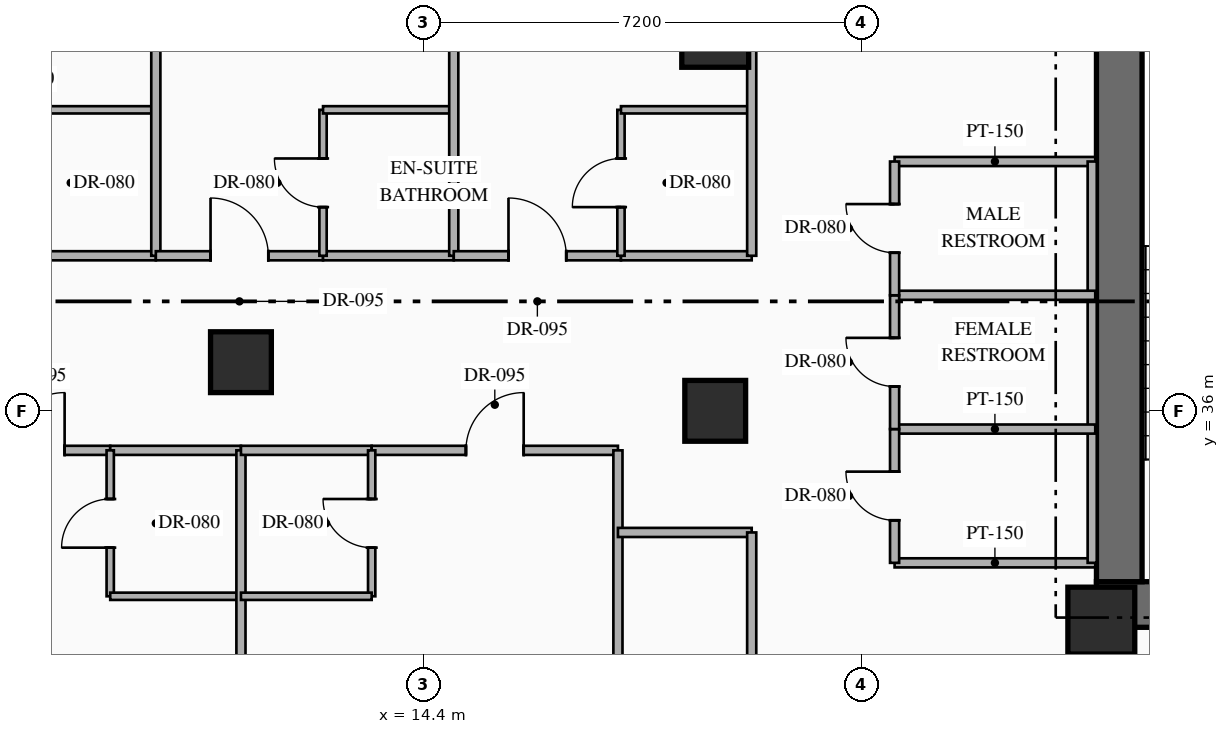
"""IFC4 building model, lengths in metres.
Left out: names, types, materials, properties, quantities, classifications, styles, units other than length and angle.
Written with IfcOpenShell. Run it as: python <this file> out.ifc"""

import sys

from ifc_helpers import new_model, si_unit, direction, frame, frame_2d, origin, origin_2d, place, context, subcontext, project, spatial, rectangle, hollow_rectangle, extrude, element, fill, save


model = new_model("IFC4")
c1 = context("Model", 3, precision=1e-05, world=origin(), true_north=direction((0.0, 1.0)))
c2 = subcontext(c1, "Body", "Model", "MODEL_VIEW")
j1 = project(units=[si_unit("LENGTHUNIT", "METRE"), si_unit("PLANEANGLEUNIT", "RADIAN")], contexts=[c1])
p1 = place(None, origin())
s1 = spatial("IfcSite", under=j1, at=p1, CompositionType="ELEMENT")
p2 = place(p1, origin())
s2 = spatial("IfcBuilding", under=s1, at=p2, CompositionType="ELEMENT")
p3 = place(p2, frame((0.0, 0.0, 46.65)))
s3 = spatial("IfcBuildingStorey", under=s2, at=p3, CompositionType="ELEMENT", Elevation=46.65)
p4 = place(p3, frame((25.47, 32.815, 0.0), z_axis=(0.0, 0.0, 1.0), x_axis=(1.0, 0.0, 0.0)))
e1 = element("IfcWall", 1, at=p4, inside=s3, PredefinedType="SHEAR", context=c2, shape_type="SweptSolid", body=[
    extrude(rectangle(XDim=8.08, YDim=0.75, at=frame_2d((4.04, 0.0))), origin(), (0.0, 0.0, 1.0), 3.35),
])
p5 = place(p4, frame((2.98, 0.0, 0.0)))
e2 = element("IfcOpeningElement", 2, at=p5, cuts=e1, PredefinedType="OPENING", context=c2, shape_type="SweptSolid", body=[
    extrude(rectangle(XDim=1.1, YDim=2.2, at=frame_2d((0.55, 1.1))), frame((0.0, 0.385, 0.0), z_axis=(0.0, -1.0, 0.0), x_axis=(1.0, 0.0, 0.0)), (0.0, 0.0, 1.0), 0.77),
])
p6 = place(p4, frame((5.73, 0.0, 0.0)))
e3 = element("IfcOpeningElement", 3, at=p6, cuts=e1, PredefinedType="OPENING", context=c2, shape_type="SweptSolid", body=[
    extrude(rectangle(XDim=1.1, YDim=2.15, at=frame_2d((0.55, 1.075))), frame((0.0, 0.385, 0.0), z_axis=(0.0, -1.0, 0.0), x_axis=(1.0, 0.0, 0.0)), (0.0, 0.0, 1.0), 0.77),
])
p7 = place(p3, frame((25.845, 33.19, 0.0), z_axis=(0.0, 0.0, 1.0), x_axis=(0.0, 1.0, 0.0)))
e4 = element("IfcWall", 4, at=p7, inside=s3, PredefinedType="SHEAR", context=c2, shape_type="SweptSolid", body=[
    extrude(rectangle(XDim=9.48, YDim=0.75, at=frame_2d((4.74, 0.0))), origin(), (0.0, 0.0, 1.0), 3.35),
])
p8 = place(p3, frame((25.55, 32.55, 0.0), z_axis=(0.0, 0.0, 1.0), x_axis=(1.0, 0.0, 0.0)))
e5 = element("IfcColumn", 5, at=p8, inside=s3, PredefinedType="COLUMN", context=c2, shape_type="SweptSolid", body=[
    extrude(rectangle(XDim=1.1, YDim=1.1, at=origin_2d()), origin(), (0.0, 0.0, 1.0), 3.35),
])
p9 = place(p3, frame((19.2, 42.2, 0.0), z_axis=(0.0, 0.0, 1.0), x_axis=(1.0, 0.0, 0.0)))
e6 = element("IfcColumn", 6, at=p9, inside=s3, PredefinedType="COLUMN", context=c2, shape_type="SweptSolid", body=[
    extrude(hollow_rectangle(XDim=1.1, YDim=1.1, WallThickness=0.04, at=origin_2d()), origin(), (0.0, 0.0, 1.0), 3.35),
])
for number, where, z_axis, x_axis in (
    (7, (11.4, 36.8, 0.0), (0.0, 0.0, 1.0), (1.0, 0.0, 0.0)),
    (8, (19.2, 36.0, 0.0), (0.0, 0.0, 1.0), (1.0, 0.0, 0.0)),
):
    element("IfcColumn", number, at=place(p3, frame(where, z_axis=z_axis, x_axis=x_axis)), inside=s3, PredefinedType="COLUMN", context=c2, shape_type="SweptSolid", body=[
        extrude(hollow_rectangle(XDim=1.0, YDim=1.0, WallThickness=0.038, at=origin_2d()), origin(), (0.0, 0.0, 1.0), 3.35),
    ])
for number, where, z_axis, x_axis in (
    (9, (22.15, 33.5, 0.0), (0.0, 0.0, 1.0), (1.0, 0.0, 0.0)),
    (10, (22.15, 40.1, 0.0), (0.0, 0.0, 1.0), (1.0, 0.0, 0.0)),
):
    element("IfcWall", number, at=place(p3, frame(where, z_axis=z_axis, x_axis=x_axis)), inside=s3, PredefinedType="PARTITIONING", context=c2, shape_type="SweptSolid", body=[
        extrude(rectangle(XDim=3.3, YDim=0.15, at=frame_2d((1.65, 0.0))), origin(), (0.0, 0.0, 1.0), 3.13),
    ])
p10 = place(p3, frame((25.4, 33.5, 0.0), z_axis=(0.0, 0.0, 1.0), x_axis=(0.0, 1.0, 0.0)))
e11 = element("IfcWall", 11, at=p10, inside=s3, PredefinedType="PARTITIONING", context=c2, shape_type="SweptSolid", body=[
    extrude(rectangle(XDim=6.6, YDim=0.15, at=frame_2d((3.3, 0.0))), origin(), (0.0, 0.0, 1.0), 3.13),
])
for number, where, z_axis, x_axis in (
    (12, (22.15, 35.7, 0.0), (0.0, 0.0, 1.0), (1.0, 0.0, 0.0)),
    (13, (22.15, 37.9, 0.0), (0.0, 0.0, 1.0), (1.0, 0.0, 0.0)),
):
    element("IfcWall", number, at=place(p3, frame(where, z_axis=z_axis, x_axis=x_axis)), inside=s3, PredefinedType="PARTITIONING", context=c2, shape_type="SweptSolid", body=[
        extrude(rectangle(XDim=3.3, YDim=0.15, at=frame_2d((1.65, 0.0))), origin(), (0.0, 0.0, 1.0), 3.13),
    ])
p11 = place(p3, frame((22.15, 33.5, 0.0), z_axis=(0.0, 0.0, 1.0), x_axis=(0.0, 1.0, 0.0)))
e14 = element("IfcWall", 14, at=p11, inside=s3, PredefinedType="PARTITIONING", context=c2, shape_type="SweptSolid", body=[
    extrude(rectangle(XDim=2.2, YDim=0.15, at=frame_2d((1.1, 0.0))), origin(), (0.0, 0.0, 1.0), 3.13),
])
p12 = place(p11, frame((0.7, 0.0, 0.0)))
e15 = element("IfcOpeningElement", 15, at=p12, cuts=e14, PredefinedType="OPENING", context=c2, shape_type="SweptSolid", body=[
    extrude(rectangle(XDim=0.8, YDim=2.06, at=frame_2d((0.4, 1.03))), frame((0.0, 0.085, 0.0), z_axis=(0.0, -1.0, 0.0), x_axis=(1.0, 0.0, 0.0)), (0.0, 0.0, 1.0), 0.17),
])
p13 = place(p3, frame((22.15, 35.7, 0.0), z_axis=(0.0, 0.0, 1.0), x_axis=(0.0, 1.0, 0.0)))
e16 = element("IfcWall", 16, at=p13, inside=s3, PredefinedType="PARTITIONING", context=c2, shape_type="SweptSolid", body=[
    extrude(rectangle(XDim=2.2, YDim=0.15, at=frame_2d((1.1, 0.0))), origin(), (0.0, 0.0, 1.0), 3.13),
])
p14 = place(p13, frame((0.7, 0.0, 0.0)))
e17 = element("IfcOpeningElement", 17, at=p14, cuts=e16, PredefinedType="OPENING", context=c2, shape_type="SweptSolid", body=[
    extrude(rectangle(XDim=0.8, YDim=2.06, at=frame_2d((0.4, 1.03))), frame((0.0, 0.085, 0.0), z_axis=(0.0, -1.0, 0.0), x_axis=(1.0, 0.0, 0.0)), (0.0, 0.0, 1.0), 0.17),
])
p15 = place(p3, frame((22.15, 37.9, 0.0), z_axis=(0.0, 0.0, 1.0), x_axis=(0.0, 1.0, 0.0)))
e18 = element("IfcWall", 18, at=p15, inside=s3, PredefinedType="PARTITIONING", context=c2, shape_type="SweptSolid", body=[
    extrude(rectangle(XDim=2.2, YDim=0.15, at=frame_2d((1.1, 0.0))), origin(), (0.0, 0.0, 1.0), 3.13),
])
p16 = place(p15, frame((0.7, 0.0, 0.0)))
e19 = element("IfcOpeningElement", 19, at=p16, cuts=e18, PredefinedType="OPENING", context=c2, shape_type="SweptSolid", body=[
    extrude(rectangle(XDim=0.8, YDim=2.06, at=frame_2d((0.4, 1.03))), frame((0.0, 0.085, 0.0), z_axis=(0.0, -1.0, 0.0), x_axis=(1.0, 0.0, 0.0)), (0.0, 0.0, 1.0), 0.17),
])
p17 = place(p3, frame((7.85, 38.55, 0.0), z_axis=(0.0, 0.0, 1.0), x_axis=(1.0, 0.0, 0.0)))
e20 = element("IfcWall", 20, at=p17, inside=s3, PredefinedType="PARTITIONING", context=c2, shape_type="SweptSolid", body=[
    extrude(rectangle(XDim=2.15, YDim=0.15, at=frame_2d((1.075, 0.0))), origin(), (0.0, 0.0, 1.0), 2.775),
])
p18 = place(p3, frame((7.85, 40.95, 0.0), z_axis=(0.0, 0.0, 1.0), x_axis=(1.0, 0.0, 0.0)))
e21 = element("IfcWall", 21, at=p18, inside=s3, PredefinedType="PARTITIONING", context=c2, shape_type="SweptSolid", body=[
    extrude(rectangle(XDim=2.15, YDim=0.12, at=frame_2d((1.075, 0.0))), origin(), (0.0, 0.0, 1.0), 2.775),
])
p19 = place(p3, frame((10.0, 38.55, 0.0), z_axis=(0.0, 0.0, 1.0), x_axis=(0.0, 1.0, 0.0)))
e22 = element("IfcWall", 22, at=p19, inside=s3, PredefinedType="PARTITIONING", context=c2, shape_type="SweptSolid", body=[
    extrude(rectangle(XDim=11.65, YDim=0.15, at=frame_2d((5.825, 0.0))), origin(), (0.0, 0.0, 1.0), 3.13),
])
p20 = place(p3, frame((10.0, 38.55, 0.0), z_axis=(0.0, 0.0, 1.0), x_axis=(1.0, 0.0, 0.0)))
e23 = element("IfcWall", 23, at=p20, inside=s3, PredefinedType="PARTITIONING", context=c2, shape_type="SweptSolid", body=[
    extrude(rectangle(XDim=2.75, YDim=0.15, at=frame_2d((1.375, 0.0))), origin(), (0.0, 0.0, 1.0), 2.775),
])
p21 = place(p20, frame((0.9, 0.0, 0.0)))
e24 = element("IfcOpeningElement", 24, at=p21, cuts=e23, PredefinedType="OPENING", context=c2, shape_type="SweptSolid", body=[
    extrude(rectangle(XDim=0.95, YDim=2.15, at=frame_2d((0.475, 1.075))), frame((0.0, 0.085, 0.0), z_axis=(0.0, -1.0, 0.0), x_axis=(1.0, 0.0, 0.0)), (0.0, 0.0, 1.0), 0.17),
])
p22 = place(p3, frame((12.75, 38.55, 0.0), z_axis=(0.0, 0.0, 1.0), x_axis=(1.0, 0.0, 0.0)))
e25 = element("IfcWall", 25, at=p22, inside=s3, PredefinedType="PARTITIONING", context=c2, shape_type="SweptSolid", body=[
    extrude(rectangle(XDim=2.15, YDim=0.15, at=frame_2d((1.075, 0.0))), origin(), (0.0, 0.0, 1.0), 2.775),
])
p23 = place(p3, frame((12.75, 38.55, 0.0), z_axis=(0.0, 0.0, 1.0), x_axis=(0.0, 1.0, 0.0)))
e26 = element("IfcWall", 26, at=p23, inside=s3, PredefinedType="PARTITIONING", context=c2, shape_type="SweptSolid", body=[
    extrude(rectangle(XDim=2.4, YDim=0.12, at=frame_2d((1.2, 0.0))), origin(), (0.0, 0.0, 1.0), 3.13),
])
p24 = place(p23, frame((0.8, 0.0, 0.0)))
e27 = element("IfcOpeningElement", 27, at=p24, cuts=e26, PredefinedType="OPENING", context=c2, shape_type="SweptSolid", body=[
    extrude(rectangle(XDim=0.8, YDim=2.06, at=frame_2d((0.4, 1.03))), frame((0.0, 0.07, 0.0), z_axis=(0.0, -1.0, 0.0), x_axis=(1.0, 0.0, 0.0)), (0.0, 0.0, 1.0), 0.14),
])
p25 = place(p3, frame((12.75, 40.95, 0.0), z_axis=(0.0, 0.0, 1.0), x_axis=(1.0, 0.0, 0.0)))
e28 = element("IfcWall", 28, at=p25, inside=s3, PredefinedType="PARTITIONING", context=c2, shape_type="SweptSolid", body=[
    extrude(rectangle(XDim=2.15, YDim=0.12, at=frame_2d((1.075, 0.0))), origin(), (0.0, 0.0, 1.0), 2.775),
])
p26 = place(p3, frame((14.9, 38.55, 0.0), z_axis=(0.0, 0.0, 1.0), x_axis=(0.0, 1.0, 0.0)))
e29 = element("IfcWall", 29, at=p26, inside=s3, PredefinedType="PARTITIONING", context=c2, shape_type="SweptSolid", body=[
    extrude(rectangle(XDim=11.65, YDim=0.15, at=frame_2d((5.825, 0.0))), origin(), (0.0, 0.0, 1.0), 3.13),
])
p27 = place(p3, frame((14.9, 38.55, 0.0), z_axis=(0.0, 0.0, 1.0), x_axis=(1.0, 0.0, 0.0)))
e30 = element("IfcWall", 30, at=p27, inside=s3, PredefinedType="PARTITIONING", context=c2, shape_type="SweptSolid", body=[
    extrude(rectangle(XDim=2.75, YDim=0.15, at=frame_2d((1.375, 0.0))), origin(), (0.0, 0.0, 1.0), 2.775),
])
p28 = place(p27, frame((0.9, 0.0, 0.0)))
e31 = element("IfcOpeningElement", 31, at=p28, cuts=e30, PredefinedType="OPENING", context=c2, shape_type="SweptSolid", body=[
    extrude(rectangle(XDim=0.95, YDim=2.15, at=frame_2d((0.475, 1.075))), frame((0.0, 0.085, 0.0), z_axis=(0.0, -1.0, 0.0), x_axis=(1.0, 0.0, 0.0)), (0.0, 0.0, 1.0), 0.17),
])
p29 = place(p3, frame((17.65, 38.55, 0.0), z_axis=(0.0, 0.0, 1.0), x_axis=(1.0, 0.0, 0.0)))
e32 = element("IfcWall", 32, at=p29, inside=s3, PredefinedType="PARTITIONING", context=c2, shape_type="SweptSolid", body=[
    extrude(rectangle(XDim=2.15, YDim=0.15, at=frame_2d((1.075, 0.0))), origin(), (0.0, 0.0, 1.0), 2.775),
])
p30 = place(p3, frame((17.65, 38.55, 0.0), z_axis=(0.0, 0.0, 1.0), x_axis=(0.0, 1.0, 0.0)))
e33 = element("IfcWall", 33, at=p30, inside=s3, PredefinedType="PARTITIONING", context=c2, shape_type="SweptSolid", body=[
    extrude(rectangle(XDim=2.4, YDim=0.12, at=frame_2d((1.2, 0.0))), origin(), (0.0, 0.0, 1.0), 3.13),
])
p31 = place(p30, frame((0.8, 0.0, 0.0)))
e34 = element("IfcOpeningElement", 34, at=p31, cuts=e33, PredefinedType="OPENING", context=c2, shape_type="SweptSolid", body=[
    extrude(rectangle(XDim=0.8, YDim=2.06, at=frame_2d((0.4, 1.03))), frame((0.0, 0.07, 0.0), z_axis=(0.0, -1.0, 0.0), x_axis=(1.0, 0.0, 0.0)), (0.0, 0.0, 1.0), 0.14),
])
p32 = place(p3, frame((17.65, 40.95, 0.0), z_axis=(0.0, 0.0, 1.0), x_axis=(1.0, 0.0, 0.0)))
e35 = element("IfcWall", 35, at=p32, inside=s3, PredefinedType="PARTITIONING", context=c2, shape_type="SweptSolid", body=[
    extrude(rectangle(XDim=2.15, YDim=0.12, at=frame_2d((1.075, 0.0))), origin(), (0.0, 0.0, 1.0), 2.775),
])
p33 = place(p3, frame((19.8, 38.55, 0.0), z_axis=(0.0, 0.0, 1.0), x_axis=(0.0, 1.0, 0.0)))
e36 = element("IfcWall", 36, at=p33, inside=s3, PredefinedType="PARTITIONING", context=c2, shape_type="SweptSolid", body=[
    extrude(rectangle(XDim=11.65, YDim=0.15, at=frame_2d((5.825, 0.0))), origin(), (0.0, 0.0, 1.0), 3.13),
])
p34 = place(p3, frame((6.8, 35.35, 0.0), z_axis=(0.0, 0.0, 1.0), x_axis=(1.0, 0.0, 0.0)))
e37 = element("IfcWall", 37, at=p34, inside=s3, PredefinedType="PARTITIONING", context=c2, shape_type="SweptSolid", body=[
    extrude(rectangle(XDim=2.45, YDim=0.15, at=frame_2d((1.225, 0.0))), origin(), (0.0, 0.0, 1.0), 3.13),
])
p35 = place(p34, frame((0.75, 0.0, 0.0)))
e38 = element("IfcOpeningElement", 38, at=p35, cuts=e37, PredefinedType="OPENING", context=c2, shape_type="SweptSolid", body=[
    extrude(rectangle(XDim=0.95, YDim=2.15, at=frame_2d((0.475, 1.075))), frame((0.0, 0.085, 0.0), z_axis=(0.0, -1.0, 0.0), x_axis=(1.0, 0.0, 0.0)), (0.0, 0.0, 1.0), 0.17),
])
p36 = place(p3, frame((9.25, 35.35, 0.0), z_axis=(0.0, 0.0, 1.0), x_axis=(1.0, 0.0, 0.0)))
e39 = element("IfcWall", 39, at=p36, inside=s3, PredefinedType="PARTITIONING", context=c2, shape_type="SweptSolid", body=[
    extrude(rectangle(XDim=2.15, YDim=0.15, at=frame_2d((1.075, 0.0))), origin(), (0.0, 0.0, 1.0), 3.13),
])
p37 = place(p3, frame((9.25, 32.95, 0.0), z_axis=(0.0, 0.0, 1.0), x_axis=(0.0, 1.0, 0.0)))
e40 = element("IfcWall", 40, at=p37, inside=s3, PredefinedType="PARTITIONING", context=c2, shape_type="SweptSolid", body=[
    extrude(rectangle(XDim=2.4, YDim=0.12, at=frame_2d((1.2, 0.0))), origin(), (0.0, 0.0, 1.0), 3.13),
])
p38 = place(p37, frame((0.8, 0.0, 0.0)))
e41 = element("IfcOpeningElement", 41, at=p38, cuts=e40, PredefinedType="OPENING", context=c2, shape_type="SweptSolid", body=[
    extrude(rectangle(XDim=0.8, YDim=2.06, at=frame_2d((0.4, 1.03))), frame((0.0, 0.07, 0.0), z_axis=(0.0, -1.0, 0.0), x_axis=(1.0, 0.0, 0.0)), (0.0, 0.0, 1.0), 0.14),
])
p39 = place(p3, frame((9.25, 32.95, 0.0), z_axis=(0.0, 0.0, 1.0), x_axis=(1.0, 0.0, 0.0)))
e42 = element("IfcWall", 42, at=p39, inside=s3, PredefinedType="PARTITIONING", context=c2, shape_type="SweptSolid", body=[
    extrude(rectangle(XDim=2.15, YDim=0.12, at=frame_2d((1.075, 0.0))), origin(), (0.0, 0.0, 1.0), 3.13),
])
p40 = place(p3, frame((11.4, 23.6, 0.0), z_axis=(0.0, 0.0, 1.0), x_axis=(0.0, 1.0, 0.0)))
e43 = element("IfcWall", 43, at=p40, inside=s3, PredefinedType="PARTITIONING", context=c2, shape_type="SweptSolid", body=[
    extrude(rectangle(XDim=11.75, YDim=0.15, at=frame_2d((5.875, 0.0))), origin(), (0.0, 0.0, 1.0), 2.425),
])
p41 = place(p3, frame((11.4, 35.35, 0.0), z_axis=(0.0, 0.0, 1.0), x_axis=(1.0, 0.0, 0.0)))
e44 = element("IfcWall", 44, at=p41, inside=s3, PredefinedType="PARTITIONING", context=c2, shape_type="SweptSolid", body=[
    extrude(rectangle(XDim=2.15, YDim=0.15, at=frame_2d((1.075, 0.0))), origin(), (0.0, 0.0, 1.0), 3.13),
])
p42 = place(p3, frame((13.55, 35.35, 0.0), z_axis=(0.0, 0.0, 1.0), x_axis=(1.0, 0.0, 0.0)))
e45 = element("IfcWall", 45, at=p42, inside=s3, PredefinedType="PARTITIONING", context=c2, shape_type="SweptSolid", body=[
    extrude(rectangle(XDim=4.05, YDim=0.15, at=frame_2d((2.025, 0.0))), origin(), (0.0, 0.0, 1.0), 3.13),
])
p43 = place(p42, frame((1.55, 0.0, 0.0)))
e46 = element("IfcOpeningElement", 46, at=p43, cuts=e45, PredefinedType="OPENING", context=c2, shape_type="SweptSolid", body=[
    extrude(rectangle(XDim=0.95, YDim=2.15, at=frame_2d((0.475, 1.075))), frame((0.0, 0.085, 0.0), z_axis=(0.0, -1.0, 0.0), x_axis=(1.0, 0.0, 0.0)), (0.0, 0.0, 1.0), 0.17),
])
p44 = place(p3, frame((13.55, 32.95, 0.0), z_axis=(0.0, 0.0, 1.0), x_axis=(0.0, 1.0, 0.0)))
e47 = element("IfcWall", 47, at=p44, inside=s3, PredefinedType="PARTITIONING", context=c2, shape_type="SweptSolid", body=[
    extrude(rectangle(XDim=2.4, YDim=0.12, at=frame_2d((1.2, 0.0))), origin(), (0.0, 0.0, 1.0), 3.13),
])
p45 = place(p44, frame((0.8, 0.0, 0.0)))
e48 = element("IfcOpeningElement", 48, at=p45, cuts=e47, PredefinedType="OPENING", context=c2, shape_type="SweptSolid", body=[
    extrude(rectangle(XDim=0.8, YDim=2.06, at=frame_2d((0.4, 1.03))), frame((0.0, 0.07, 0.0), z_axis=(0.0, -1.0, 0.0), x_axis=(1.0, 0.0, 0.0)), (0.0, 0.0, 1.0), 0.14),
])
p46 = place(p3, frame((11.4, 32.95, 0.0), z_axis=(0.0, 0.0, 1.0), x_axis=(1.0, 0.0, 0.0)))
e49 = element("IfcWall", 49, at=p46, inside=s3, PredefinedType="PARTITIONING", context=c2, shape_type="SweptSolid", body=[
    extrude(rectangle(XDim=2.15, YDim=0.12, at=frame_2d((1.075, 0.0))), origin(), (0.0, 0.0, 1.0), 3.13),
])
p47 = place(p3, frame((17.6, 23.6, 0.0), z_axis=(0.0, 0.0, 1.0), x_axis=(0.0, 1.0, 0.0)))
e50 = element("IfcWall", 50, at=p47, inside=s3, PredefinedType="PARTITIONING", context=c2, shape_type="SweptSolid", body=[
    extrude(rectangle(XDim=11.75, YDim=0.15, at=frame_2d((5.875, 0.0))), origin(), (0.0, 0.0, 1.0), 3.13),
])
p48 = place(p3, frame((17.6, 34.0, 0.0), z_axis=(0.0, 0.0, 1.0), x_axis=(1.0, 0.0, 0.0)))
e51 = element("IfcWall", 51, at=p48, inside=s3, PredefinedType="PARTITIONING", context=c2, shape_type="SweptSolid", body=[
    extrude(rectangle(XDim=2.2, YDim=0.15, at=frame_2d((1.1, 0.0))), origin(), (0.0, 0.0, 1.0), 3.13),
])
p49 = place(p3, frame((19.8, 23.44, 0.0), z_axis=(0.0, 0.0, 1.0), x_axis=(0.0, 1.0, 0.0)))
e52 = element("IfcWall", 52, at=p49, inside=s3, PredefinedType="PARTITIONING", context=c2, shape_type="SweptSolid", body=[
    extrude(rectangle(XDim=10.56, YDim=0.15, at=frame_2d((5.28, 0.0))), origin(), (0.0, 0.0, 1.0), 3.13),
])
p50 = place(p49, frame((3.495, 0.0, 0.0)))
e53 = element("IfcOpeningElement", 53, at=p50, cuts=e52, PredefinedType="OPENING", context=c2, shape_type="SweptSolid", body=[
    extrude(rectangle(XDim=0.9, YDim=2.15, at=frame_2d((0.45, 1.075))), frame((0.0, 0.085, 0.0), z_axis=(0.0, -1.0, 0.0), x_axis=(1.0, 0.0, 0.0)), (0.0, 0.0, 1.0), 0.17),
])
p51 = place(p12, origin())
e54 = element("IfcDoor", 54, at=p51, inside=s3, OperationType="SINGLE_SWING_RIGHT", PredefinedType="DOOR", context=c2, shape_type="SweptSolid", body=[
    extrude(rectangle(XDim=0.8, YDim=2.06, at=frame_2d((0.4, 1.03))), frame((0.0, 0.025, 0.0), z_axis=(0.0, -1.0, 0.0), x_axis=(1.0, 0.0, 0.0)), (0.0, 0.0, 1.0), 0.05),
])
fill(e15, e54)
p52 = place(p14, origin())
e55 = element("IfcDoor", 55, at=p52, inside=s3, OperationType="SINGLE_SWING_RIGHT", PredefinedType="DOOR", context=c2, shape_type="SweptSolid", body=[
    extrude(rectangle(XDim=0.8, YDim=2.06, at=frame_2d((0.4, 1.03))), frame((0.0, 0.025, 0.0), z_axis=(0.0, -1.0, 0.0), x_axis=(1.0, 0.0, 0.0)), (0.0, 0.0, 1.0), 0.05),
])
fill(e17, e55)
p53 = place(p16, origin())
e56 = element("IfcDoor", 56, at=p53, inside=s3, OperationType="SINGLE_SWING_RIGHT", PredefinedType="DOOR", context=c2, shape_type="SweptSolid", body=[
    extrude(rectangle(XDim=0.8, YDim=2.06, at=frame_2d((0.4, 1.03))), frame((0.0, 0.025, 0.0), z_axis=(0.0, -1.0, 0.0), x_axis=(1.0, 0.0, 0.0)), (0.0, 0.0, 1.0), 0.05),
])
fill(e19, e56)
p54 = place(p21, origin())
e57 = element("IfcDoor", 57, at=p54, inside=s3, OperationType="SINGLE_SWING_LEFT", PredefinedType="DOOR", context=c2, shape_type="SweptSolid", body=[
    extrude(rectangle(XDim=0.95, YDim=2.15, at=frame_2d((0.475, 1.075))), frame((0.0, 0.025, 0.0), z_axis=(0.0, -1.0, 0.0), x_axis=(1.0, 0.0, 0.0)), (0.0, 0.0, 1.0), 0.05),
])
fill(e24, e57)
p55 = place(p24, origin())
e58 = element("IfcDoor", 58, at=p55, inside=s3, OperationType="SINGLE_SWING_RIGHT", PredefinedType="DOOR", context=c2, shape_type="SweptSolid", body=[
    extrude(rectangle(XDim=0.8, YDim=2.06, at=frame_2d((0.4, 1.03))), frame((0.0, 0.025, 0.0), z_axis=(0.0, -1.0, 0.0), x_axis=(1.0, 0.0, 0.0)), (0.0, 0.0, 1.0), 0.05),
])
fill(e27, e58)
p56 = place(p28, origin())
e59 = element("IfcDoor", 59, at=p56, inside=s3, OperationType="SINGLE_SWING_LEFT", PredefinedType="DOOR", context=c2, shape_type="SweptSolid", body=[
    extrude(rectangle(XDim=0.95, YDim=2.15, at=frame_2d((0.475, 1.075))), frame((0.0, 0.025, 0.0), z_axis=(0.0, -1.0, 0.0), x_axis=(1.0, 0.0, 0.0)), (0.0, 0.0, 1.0), 0.05),
])
fill(e31, e59)
p57 = place(p31, origin())
e60 = element("IfcDoor", 60, at=p57, inside=s3, OperationType="SINGLE_SWING_LEFT", PredefinedType="DOOR", context=c2, shape_type="SweptSolid", body=[
    extrude(rectangle(XDim=0.8, YDim=2.06, at=frame_2d((0.4, 1.03))), frame((0.0, 0.025, 0.0), z_axis=(0.0, -1.0, 0.0), x_axis=(1.0, 0.0, 0.0)), (0.0, 0.0, 1.0), 0.05),
])
fill(e34, e60)
p58 = place(p35, origin())
e61 = element("IfcDoor", 61, at=p58, inside=s3, OperationType="SINGLE_SWING_RIGHT", PredefinedType="DOOR", context=c2, shape_type="SweptSolid", body=[
    extrude(rectangle(XDim=0.95, YDim=2.15, at=frame_2d((0.475, 1.075))), frame((0.0, 0.025, 0.0), z_axis=(0.0, -1.0, 0.0), x_axis=(1.0, 0.0, 0.0)), (0.0, 0.0, 1.0), 0.05),
])
fill(e38, e61)
p59 = place(p38, origin())
e62 = element("IfcDoor", 62, at=p59, inside=s3, OperationType="SINGLE_SWING_LEFT", PredefinedType="DOOR", context=c2, shape_type="SweptSolid", body=[
    extrude(rectangle(XDim=0.8, YDim=2.06, at=frame_2d((0.4, 1.03))), frame((0.0, 0.025, 0.0), z_axis=(0.0, -1.0, 0.0), x_axis=(1.0, 0.0, 0.0)), (0.0, 0.0, 1.0), 0.05),
])
fill(e41, e62)
p60 = place(p43, origin())
e63 = element("IfcDoor", 63, at=p60, inside=s3, OperationType="SINGLE_SWING_RIGHT", PredefinedType="DOOR", context=c2, shape_type="SweptSolid", body=[
    extrude(rectangle(XDim=0.95, YDim=2.15, at=frame_2d((0.475, 1.075))), frame((0.0, 0.025, 0.0), z_axis=(0.0, -1.0, 0.0), x_axis=(1.0, 0.0, 0.0)), (0.0, 0.0, 1.0), 0.05),
])
fill(e46, e63)
p61 = place(p45, origin())
e64 = element("IfcDoor", 64, at=p61, inside=s3, OperationType="SINGLE_SWING_RIGHT", PredefinedType="DOOR", context=c2, shape_type="SweptSolid", body=[
    extrude(rectangle(XDim=0.8, YDim=2.06, at=frame_2d((0.4, 1.03))), frame((0.0, 0.025, 0.0), z_axis=(0.0, -1.0, 0.0), x_axis=(1.0, 0.0, 0.0)), (0.0, 0.0, 1.0), 0.05),
])
fill(e48, e64)
save(model, sys.argv[1])
